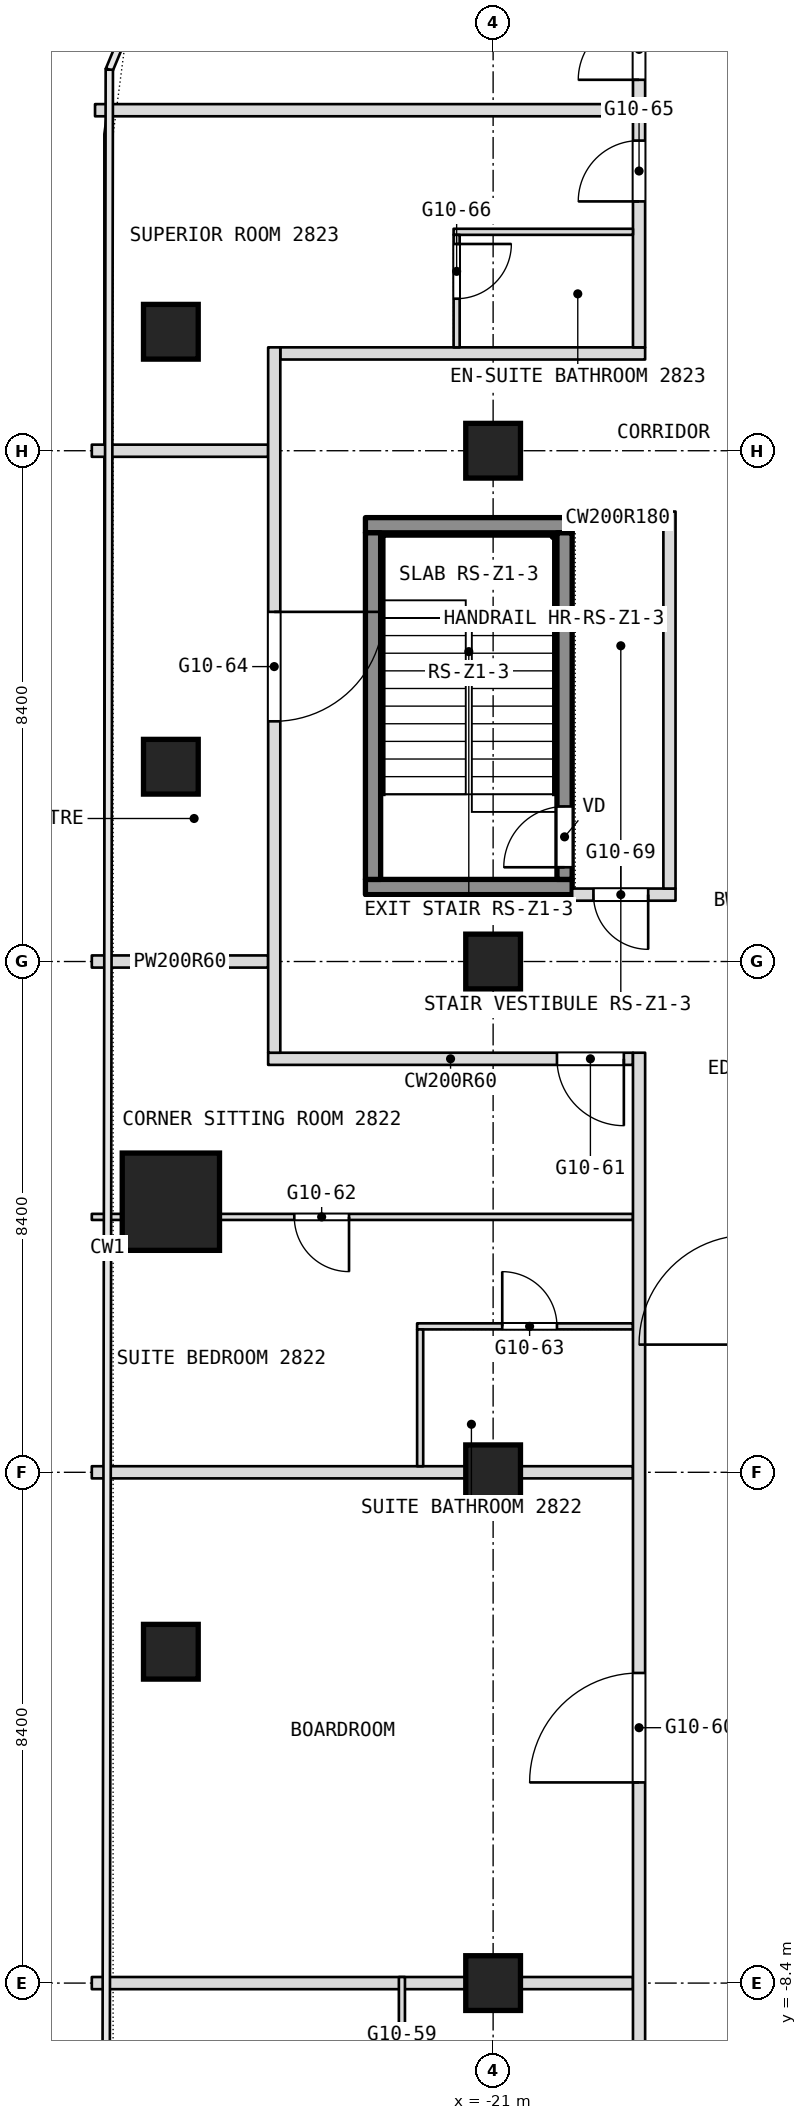
"""IFC4 building model, lengths in metres.
Left out: names, types, materials, properties, quantities, classifications, styles, units other than length and angle.
Written with IfcOpenShell. Run it as: python <this file> out.ifc"""

import sys

from ifc_helpers import new_model, si_unit, direction, frame, frame_2d, origin, origin_2d, place, context, subcontext, project, spatial, rectangle, extrude, element, fill, save


model = new_model("IFC4")
c1 = context("Model", 3, precision=1e-05, world=origin(), true_north=direction((0.0, 1.0)))
c2 = subcontext(c1, "Body", "Model", "MODEL_VIEW")
j1 = project(units=[si_unit("LENGTHUNIT", "METRE"), si_unit("PLANEANGLEUNIT", "RADIAN")], contexts=[c1])
p1 = place(None, origin())
s1 = spatial("IfcSite", under=j1, at=p1, CompositionType="ELEMENT")
p2 = place(p1, origin())
s2 = spatial("IfcBuilding", under=s1, at=p2, CompositionType="ELEMENT")
p3 = place(p2, frame((0.0, 0.0, 126.5)))
s3 = spatial("IfcBuildingStorey", under=s2, at=p3, CompositionType="ELEMENT", Elevation=126.5)
p4 = place(p3, frame((-26.3, 4.45, 0.0), z_axis=(0.0, 0.0, 1.0), x_axis=(1.0, 0.0, 0.0)))
e1 = element("IfcColumn", 1, at=p4, inside=s3, PredefinedType="COLUMN", context=c2, shape_type="SweptSolid", body=[
    extrude(rectangle(XDim=1.6, YDim=1.6, at=origin_2d()), origin(), (0.0, 0.0, 1.0), 3.6),
])
for number, where, z_axis, x_axis in (
    (2, (-21.0, -8.4, 0.0), (0.0, 0.0, 1.0), (1.0, 0.0, 0.0)),
    (3, (-21.0, 0.0, 0.0), (0.0, 0.0, 1.0), (1.0, 0.0, 0.0)),
    (4, (-21.0, 8.4, 0.0), (0.0, 0.0, 1.0), (1.0, 0.0, 0.0)),
    (5, (-21.0, 16.8, 0.0), (0.0, 0.0, 1.0), (1.0, 0.0, 0.0)),
    (6, (-26.3, -2.951, 0.0), (0.0, 0.0, 1.0), (1.0, 0.0, 0.0)),
    (7, (-26.3, 11.603, 0.0), (0.0, 0.0, 1.0), (1.0, 0.0, 0.0)),
    (8, (-26.3, 18.756, 0.0), (0.0, 0.0, 1.0), (1.0, 0.0, 0.0)),
):
    element("IfcColumn", number, at=place(p3, frame(where, z_axis=z_axis, x_axis=x_axis)), inside=s3, PredefinedType="COLUMN", context=c2, shape_type="SweptSolid", body=[
        extrude(rectangle(XDim=0.9, YDim=0.9, at=origin_2d()), origin(), (0.0, 0.0, 1.0), 3.6),
    ])
for number, where, z_axis, x_axis in (
    (9, (-27.6, -8.4, 0.0), (0.0, 0.0, 1.0), (1.0, 0.0, 0.0)),
    (10, (-27.6, 0.0, 0.0), (0.0, 0.0, 1.0), (1.0, 0.0, 0.0)),
):
    element("IfcWall", number, at=place(p3, frame(where, z_axis=z_axis, x_axis=x_axis)), inside=s3, PredefinedType="PARTITIONING", context=c2, shape_type="SweptSolid", body=[
        extrude(rectangle(XDim=8.9, YDim=0.2, at=frame_2d((4.45, 0.0))), origin(), (0.0, 0.0, 1.0), 2.89),
    ])
p5 = place(p3, frame((-22.25, 2.4, 0.0), z_axis=(0.0, 0.0, 1.0), x_axis=(1.0, 0.0, 0.0)))
e11 = element("IfcWall", 11, at=p5, inside=s3, PredefinedType="PARTITIONING", context=c2, shape_type="SweptSolid", body=[
    extrude(rectangle(XDim=3.55, YDim=0.1, at=frame_2d((1.775, 0.0))), origin(), (0.0, 0.0, 1.0), 3.34),
])
p6 = place(p5, frame((1.4, 0.0, 0.0)))
e12 = element("IfcOpeningElement", 12, at=p6, cuts=e11, PredefinedType="OPENING", context=c2, shape_type="SweptSolid", body=[
    extrude(rectangle(XDim=0.9, YDim=2.1, at=frame_2d((0.45, 1.05))), frame((0.0, 0.05, 0.0), z_axis=(0.0, -1.0, 0.0), x_axis=(1.0, 0.0, 0.0)), (0.0, 0.0, 1.0), 0.1),
])
p7 = place(p3, frame((-27.6, 4.2, 0.0), z_axis=(0.0, 0.0, 1.0), x_axis=(1.0, 0.0, 0.0)))
e13 = element("IfcWall", 13, at=p7, inside=s3, PredefinedType="PARTITIONING", context=c2, shape_type="SweptSolid", body=[
    extrude(rectangle(XDim=0.5, YDim=0.1, at=frame_2d((0.25, 0.0))), origin(), (0.0, 0.0, 1.0), 3.34),
])
p8 = place(p3, frame((-25.5, 4.2, 0.0), z_axis=(0.0, 0.0, 1.0), x_axis=(1.0, 0.0, 0.0)))
e14 = element("IfcWall", 14, at=p8, inside=s3, PredefinedType="PARTITIONING", context=c2, shape_type="SweptSolid", body=[
    extrude(rectangle(XDim=6.8, YDim=0.1, at=frame_2d((3.4, 0.0))), origin(), (0.0, 0.0, 1.0), 3.34),
])
p9 = place(p8, frame((1.23, 0.0, 0.0)))
e15 = element("IfcOpeningElement", 15, at=p9, cuts=e14, PredefinedType="OPENING", context=c2, shape_type="SweptSolid", body=[
    extrude(rectangle(XDim=0.9, YDim=2.1, at=frame_2d((0.45, 1.05))), frame((0.0, 0.05, 0.0), z_axis=(0.0, -1.0, 0.0), x_axis=(1.0, 0.0, 0.0)), (0.0, 0.0, 1.0), 0.1),
])
p10 = place(p3, frame((-24.7, 6.8, 0.0), z_axis=(0.0, 0.0, 1.0), x_axis=(1.0, 0.0, 0.0)))
e16 = element("IfcWall", 16, at=p10, inside=s3, PredefinedType="PARTITIONING", context=c2, shape_type="SweptSolid", body=[
    extrude(rectangle(XDim=6.0, YDim=0.2, at=frame_2d((3.0, 0.0))), origin(), (0.0, 0.0, 1.0), 3.34),
])
p11 = place(p10, frame((4.75, 0.0, 0.0)))
e17 = element("IfcOpeningElement", 17, at=p11, cuts=e16, PredefinedType="OPENING", context=c2, shape_type="SweptSolid", body=[
    extrude(rectangle(XDim=1.1, YDim=2.1, at=frame_2d((0.55, 1.05))), frame((0.0, 0.1, 0.0), z_axis=(0.0, -1.0, 0.0), x_axis=(1.0, 0.0, 0.0)), (0.0, 0.0, 1.0), 0.2),
])
p12 = place(p3, frame((-27.6, 8.4, 0.0), z_axis=(0.0, 0.0, 1.0), x_axis=(1.0, 0.0, 0.0)))
e18 = element("IfcWall", 18, at=p12, inside=s3, PredefinedType="PARTITIONING", context=c2, shape_type="SweptSolid", body=[
    extrude(rectangle(XDim=2.9, YDim=0.2, at=frame_2d((1.45, 0.0))), origin(), (0.0, 0.0, 1.0), 2.89),
])
p13 = place(p3, frame((-19.7, 9.5, 0.0), z_axis=(0.0, 0.0, 1.0), x_axis=(1.0, 0.0, 0.0)))
e19 = element("IfcWall", 19, at=p13, inside=s3, PredefinedType="PARTITIONING", context=c2, shape_type="SweptSolid", body=[
    extrude(rectangle(XDim=1.7, YDim=0.2, at=frame_2d((0.85, 0.0))), origin(), (0.0, 0.0, 1.0), 3.34),
])
p14 = place(p13, frame((0.35, 0.0, 0.0)))
e20 = element("IfcOpeningElement", 20, at=p14, cuts=e19, PredefinedType="OPENING", context=c2, shape_type="SweptSolid", body=[
    extrude(rectangle(XDim=0.9, YDim=2.1, at=frame_2d((0.45, 1.05))), frame((0.0, 0.1, 0.0), z_axis=(0.0, -1.0, 0.0), x_axis=(1.0, 0.0, 0.0)), (0.0, 0.0, 1.0), 0.2),
])
p15 = place(p3, frame((-19.7, 15.7, 0.0), z_axis=(0.0, 0.0, 1.0), x_axis=(1.0, 0.0, 0.0)))
e21 = element("IfcWall", 21, at=p15, inside=s3, PredefinedType="PARTITIONING", context=c2, shape_type="SweptSolid", body=[
    extrude(rectangle(XDim=1.5, YDim=0.2, at=frame_2d((0.75, 0.0))), origin(), (0.0, 0.0, 1.0), 3.34),
])
p16 = place(p3, frame((-27.6, 16.8, 0.0), z_axis=(0.0, 0.0, 1.0), x_axis=(1.0, 0.0, 0.0)))
e22 = element("IfcWall", 22, at=p16, inside=s3, PredefinedType="PARTITIONING", context=c2, shape_type="SweptSolid", body=[
    extrude(rectangle(XDim=2.9, YDim=0.2, at=frame_2d((1.45, 0.0))), origin(), (0.0, 0.0, 1.0), 2.89),
])
p17 = place(p3, frame((-18.1, 9.6, 0.0), z_axis=(0.0, 0.0, 1.0), x_axis=(0.0, 1.0, 0.0)))
e23 = element("IfcWall", 23, at=p17, inside=s3, PredefinedType="PARTITIONING", context=c2, shape_type="SweptSolid", body=[
    extrude(rectangle(XDim=6.2, YDim=0.2, at=frame_2d((3.1, 0.0))), origin(), (0.0, 0.0, 1.0), 3.34),
])
p18 = place(p3, frame((-24.5, 18.4, 0.0), z_axis=(0.0, 0.0, 1.0), x_axis=(1.0, 0.0, 0.0)))
e24 = element("IfcWall", 24, at=p18, inside=s3, PredefinedType="PARTITIONING", context=c2, shape_type="SweptSolid", body=[
    extrude(rectangle(XDim=6.0, YDim=0.2, at=frame_2d((3.0, 0.0))), origin(), (0.0, 0.0, 1.0), 3.34),
])
p19 = place(p3, frame((-18.6, -21.708, 0.0), z_axis=(0.0, 0.0, 1.0), x_axis=(0.0, 1.0, 0.0)))
e25 = element("IfcWall", 25, at=p19, inside=s3, PredefinedType="PARTITIONING", context=c2, shape_type="SweptSolid", body=[
    extrude(rectangle(XDim=28.608, YDim=0.2, at=frame_2d((14.304, 0.0))), origin(), (0.0, 0.0, 1.0), 3.34),
])
p20 = place(p19, frame((2.054, 0.0, 0.0)))
e26 = element("IfcOpeningElement", 26, at=p20, cuts=e25, PredefinedType="OPENING", context=c2, shape_type="SweptSolid", body=[
    extrude(rectangle(XDim=0.9, YDim=2.1, at=frame_2d((0.45, 1.05))), frame((0.0, 0.1, 0.0), z_axis=(0.0, -1.0, 0.0), x_axis=(1.0, 0.0, 0.0)), (0.0, 0.0, 1.0), 0.2),
])
p21 = place(p19, frame((7.708, 0.0, 0.0)))
e27 = element("IfcOpeningElement", 27, at=p21, cuts=e25, PredefinedType="OPENING", context=c2, shape_type="SweptSolid", body=[
    extrude(rectangle(XDim=1.0, YDim=2.1, at=frame_2d((0.5, 1.05))), frame((0.0, 0.1, 0.0), z_axis=(0.0, -1.0, 0.0), x_axis=(1.0, 0.0, 0.0)), (0.0, 0.0, 1.0), 0.2),
])
p22 = place(p19, frame((9.508, 0.0, 0.0)))
e28 = element("IfcOpeningElement", 28, at=p22, cuts=e25, PredefinedType="OPENING", context=c2, shape_type="SweptSolid", body=[
    extrude(rectangle(XDim=1.0, YDim=2.1, at=frame_2d((0.5, 1.05))), frame((0.0, 0.1, 0.0), z_axis=(0.0, -1.0, 0.0), x_axis=(1.0, 0.0, 0.0)), (0.0, 0.0, 1.0), 0.2),
])
p23 = place(p19, frame((16.608, 0.0, 0.0)))
e29 = element("IfcOpeningElement", 29, at=p23, cuts=e25, PredefinedType="OPENING", context=c2, shape_type="SweptSolid", body=[
    extrude(rectangle(XDim=1.8, YDim=2.1, at=frame_2d((0.9, 1.05))), frame((0.0, 0.1, 0.0), z_axis=(0.0, -1.0, 0.0), x_axis=(1.0, 0.0, 0.0)), (0.0, 0.0, 1.0), 0.2),
])
p24 = place(p3, frame((-18.6, 18.5, 0.0), z_axis=(0.0, 0.0, 1.0), x_axis=(0.0, 1.0, 0.0)))
e30 = element("IfcWall", 30, at=p24, inside=s3, PredefinedType="PARTITIONING", context=c2, shape_type="SweptSolid", body=[
    extrude(rectangle(XDim=9.44, YDim=0.2, at=frame_2d((4.72, 0.0))), origin(), (0.0, 0.0, 1.0), 3.34),
])
p25 = place(p24, frame((2.4, 0.0, 0.0)))
e31 = element("IfcOpeningElement", 31, at=p25, cuts=e30, PredefinedType="OPENING", context=c2, shape_type="SweptSolid", body=[
    extrude(rectangle(XDim=1.0, YDim=2.1, at=frame_2d((0.5, 1.05))), frame((0.0, 0.1, 0.0), z_axis=(0.0, -1.0, 0.0), x_axis=(1.0, 0.0, 0.0)), (0.0, 0.0, 1.0), 0.2),
])
p26 = place(p24, frame((4.4, 0.0, 0.0)))
e32 = element("IfcOpeningElement", 32, at=p26, cuts=e30, PredefinedType="OPENING", context=c2, shape_type="SweptSolid", body=[
    extrude(rectangle(XDim=1.0, YDim=2.1, at=frame_2d((0.5, 1.05))), frame((0.0, 0.1, 0.0), z_axis=(0.0, -1.0, 0.0), x_axis=(1.0, 0.0, 0.0)), (0.0, 0.0, 1.0), 0.2),
])
p27 = place(p3, frame((-21.65, 20.4, 0.0), z_axis=(0.0, 0.0, 1.0), x_axis=(1.0, 0.0, 0.0)))
e33 = element("IfcWall", 33, at=p27, inside=s3, PredefinedType="PARTITIONING", context=c2, shape_type="SweptSolid", body=[
    extrude(rectangle(XDim=2.95, YDim=0.1, at=frame_2d((1.475, 0.0))), origin(), (0.0, 0.0, 1.0), 3.34),
])
p28 = place(p3, frame((-21.6, 18.5, 0.0), z_axis=(0.0, 0.0, 1.0), x_axis=(0.0, 1.0, 0.0)))
e34 = element("IfcWall", 34, at=p28, inside=s3, PredefinedType="PARTITIONING", context=c2, shape_type="SweptSolid", body=[
    extrude(rectangle(XDim=1.85, YDim=0.1, at=frame_2d((0.925, 0.0))), origin(), (0.0, 0.0, 1.0), 3.34),
])
p29 = place(p28, frame((0.8, 0.0, 0.0)))
e35 = element("IfcOpeningElement", 35, at=p29, cuts=e34, PredefinedType="OPENING", context=c2, shape_type="SweptSolid", body=[
    extrude(rectangle(XDim=0.9, YDim=2.1, at=frame_2d((0.45, 1.05))), frame((0.0, 0.05, 0.0), z_axis=(0.0, -1.0, 0.0), x_axis=(1.0, 0.0, 0.0)), (0.0, 0.0, 1.0), 0.1),
])
p30 = place(p3, frame((-22.2, 0.1, 0.0), z_axis=(0.0, 0.0, 1.0), x_axis=(0.0, 1.0, 0.0)))
e36 = element("IfcWall", 36, at=p30, inside=s3, PredefinedType="PARTITIONING", context=c2, shape_type="SweptSolid", body=[
    extrude(rectangle(XDim=2.25, YDim=0.1, at=frame_2d((1.125, 0.0))), origin(), (0.0, 0.0, 1.0), 3.34),
])
p31 = place(p3, frame((-27.547, 22.4, 0.0), z_axis=(0.0, 0.0, 1.0), x_axis=(1.0, 0.0, 0.0)))
e37 = element("IfcWall", 37, at=p31, inside=s3, PredefinedType="PARTITIONING", context=c2, shape_type="SweptSolid", body=[
    extrude(rectangle(XDim=8.847, YDim=0.2, at=frame_2d((4.424, 0.0))), origin(), (0.0, 0.0, 1.0), 3.34),
])
p32 = place(p3, frame((-22.5, -10.85, 0.0), z_axis=(0.0, 0.0, 1.0), x_axis=(0.0, 1.0, 0.0)))
e38 = element("IfcWall", 38, at=p32, inside=s3, PredefinedType="PARTITIONING", context=c2, shape_type="SweptSolid", body=[
    extrude(rectangle(XDim=2.55, YDim=0.1, at=frame_2d((1.275, 0.0))), origin(), (0.0, 0.0, 1.0), 3.34),
])
p33 = place(p32, frame((0.15, 0.0, 0.0)))
e39 = element("IfcOpeningElement", 39, at=p33, cuts=e38, PredefinedType="OPENING", context=c2, shape_type="SweptSolid", body=[
    extrude(rectangle(XDim=0.9, YDim=2.1, at=frame_2d((0.45, 1.05))), frame((0.0, 0.05, 0.0), z_axis=(0.0, -1.0, 0.0), x_axis=(1.0, 0.0, 0.0)), (0.0, 0.0, 1.0), 0.1),
])
p34 = place(p3, frame((-24.6, 6.9, 0.0), z_axis=(0.0, 0.0, 1.0), x_axis=(0.0, 1.0, 0.0)))
e40 = element("IfcWall", 40, at=p34, inside=s3, PredefinedType="PARTITIONING", context=c2, shape_type="SweptSolid", body=[
    extrude(rectangle(XDim=11.6, YDim=0.2, at=frame_2d((5.8, 0.0))), origin(), (0.0, 0.0, 1.0), 3.34),
])
p35 = place(p34, frame((5.45, 0.0, 0.0)))
e41 = element("IfcOpeningElement", 41, at=p35, cuts=e40, PredefinedType="OPENING", context=c2, shape_type="SweptSolid", body=[
    extrude(rectangle(XDim=1.8, YDim=2.1, at=frame_2d((0.9, 1.05))), frame((0.0, 0.1, 0.0), z_axis=(0.0, -1.0, 0.0), x_axis=(1.0, 0.0, 0.0)), (0.0, 0.0, 1.0), 0.2),
])
for number, where, z_axis, x_axis in (
    (42, (-23.1, 9.625, 0.1), (0.0, 0.0, 1.0), (1.0, 0.0, 0.0)),
    (43, (-23.1, 15.575, 0.1), (0.0, 0.0, 1.0), (1.0, 0.0, 0.0)),
):
    element("IfcWall", number, at=place(p3, frame(where, z_axis=z_axis, x_axis=x_axis)), inside=s3, PredefinedType="SHEAR", context=c2, shape_type="SweptSolid", body=[
        extrude(rectangle(XDim=3.4, YDim=0.25, at=frame_2d((1.7, 0.0))), origin(), (0.0, 0.0, 1.0), 3.6),
    ])
p36 = place(p3, frame((-22.975, 9.75, 0.1), z_axis=(0.0, 0.0, 1.0), x_axis=(0.0, 1.0, 0.0)))
e44 = element("IfcWall", 44, at=p36, inside=s3, PredefinedType="SHEAR", context=c2, shape_type="SweptSolid", body=[
    extrude(rectangle(XDim=5.7, YDim=0.25, at=frame_2d((2.85, 0.0))), origin(), (0.0, 0.0, 1.0), 3.6),
])
p37 = place(p3, frame((-19.825, 9.75, 0.1), z_axis=(0.0, 0.0, 1.0), x_axis=(0.0, 1.0, 0.0)))
e45 = element("IfcWall", 45, at=p37, inside=s3, PredefinedType="SHEAR", context=c2, shape_type="SweptSolid", body=[
    extrude(rectangle(XDim=5.7, YDim=0.25, at=frame_2d((2.85, 0.0))), origin(), (0.0, 0.0, 1.0), 3.6),
])
p38 = place(p37, frame((0.2, 0.0, 0.0)))
e46 = element("IfcOpeningElement", 46, at=p38, cuts=e45, PredefinedType="OPENING", context=c2, shape_type="SweptSolid", body=[
    extrude(rectangle(XDim=1.0, YDim=2.1, at=frame_2d((0.5, 1.05))), frame((0.0, 0.125, 0.0), z_axis=(0.0, -1.0, 0.0), x_axis=(1.0, 0.0, 0.0)), (0.0, 0.0, 1.0), 0.25),
])
p39 = place(p6, origin())
e47 = element("IfcDoor", 47, at=p39, inside=s3, OperationType="SINGLE_SWING_LEFT", PredefinedType="DOOR", context=c2, shape_type="SweptSolid", body=[
    extrude(rectangle(XDim=0.9, YDim=2.1, at=frame_2d((0.45, 1.05))), frame((0.0, 0.025, 0.0), z_axis=(0.0, -1.0, 0.0), x_axis=(1.0, 0.0, 0.0)), (0.0, 0.0, 1.0), 0.05),
])
fill(e12, e47)
p40 = place(p9, origin())
e48 = element("IfcDoor", 48, at=p40, inside=s3, OperationType="SINGLE_SWING_RIGHT", PredefinedType="DOOR", context=c2, shape_type="SweptSolid", body=[
    extrude(rectangle(XDim=0.9, YDim=2.1, at=frame_2d((0.45, 1.05))), frame((0.0, 0.025, 0.0), z_axis=(0.0, -1.0, 0.0), x_axis=(1.0, 0.0, 0.0)), (0.0, 0.0, 1.0), 0.05),
])
fill(e15, e48)
p41 = place(p11, origin())
e49 = element("IfcDoor", 49, at=p41, inside=s3, OperationType="SINGLE_SWING_LEFT", PredefinedType="DOOR", context=c2, shape_type="SweptSolid", body=[
    extrude(rectangle(XDim=1.1, YDim=2.1, at=frame_2d((0.55, 1.05))), frame((0.0, 0.025, 0.0), z_axis=(0.0, -1.0, 0.0), x_axis=(1.0, 0.0, 0.0)), (0.0, 0.0, 1.0), 0.05),
])
fill(e17, e49)
p42 = place(p14, origin())
e50 = element("IfcDoor", 50, at=p42, inside=s3, OperationType="SINGLE_SWING_RIGHT", PredefinedType="DOOR", context=c2, shape_type="SweptSolid", body=[
    extrude(rectangle(XDim=0.9, YDim=2.1, at=frame_2d((0.45, 1.05))), frame((0.0, 0.025, 0.0), z_axis=(0.0, -1.0, 0.0), x_axis=(1.0, 0.0, 0.0)), (0.0, 0.0, 1.0), 0.05),
])
fill(e20, e50)
p43 = place(p23, origin())
e51 = element("IfcDoor", 51, at=p43, inside=s3, OperationType="DOUBLE_DOOR_SINGLE_SWING", PredefinedType="DOOR", context=c2, shape_type="SweptSolid", body=[
    extrude(rectangle(XDim=1.8, YDim=2.1, at=frame_2d((0.9, 1.05))), frame((0.0, 0.025, 0.0), z_axis=(0.0, -1.0, 0.0), x_axis=(1.0, 0.0, 0.0)), (0.0, 0.0, 1.0), 0.05),
])
fill(e29, e51)
p44 = place(p25, origin())
e52 = element("IfcDoor", 52, at=p44, inside=s3, OperationType="SINGLE_SWING_RIGHT", PredefinedType="DOOR", context=c2, shape_type="SweptSolid", body=[
    extrude(rectangle(XDim=1.0, YDim=2.1, at=frame_2d((0.5, 1.05))), frame((0.0, 0.025, 0.0), z_axis=(0.0, -1.0, 0.0), x_axis=(1.0, 0.0, 0.0)), (0.0, 0.0, 1.0), 0.05),
])
fill(e31, e52)
p45 = place(p26, origin())
e53 = element("IfcDoor", 53, at=p45, inside=s3, OperationType="SINGLE_SWING_RIGHT", PredefinedType="DOOR", context=c2, shape_type="SweptSolid", body=[
    extrude(rectangle(XDim=1.0, YDim=2.1, at=frame_2d((0.5, 1.05))), frame((0.0, 0.025, 0.0), z_axis=(0.0, -1.0, 0.0), x_axis=(1.0, 0.0, 0.0)), (0.0, 0.0, 1.0), 0.05),
])
fill(e32, e53)
p46 = place(p29, origin())
e54 = element("IfcDoor", 54, at=p46, inside=s3, OperationType="SINGLE_SWING_LEFT", PredefinedType="DOOR", context=c2, shape_type="SweptSolid", body=[
    extrude(rectangle(XDim=0.9, YDim=2.1, at=frame_2d((0.45, 1.05))), frame((0.0, 0.025, 0.0), z_axis=(0.0, -1.0, 0.0), x_axis=(1.0, 0.0, 0.0)), (0.0, 0.0, 1.0), 0.05),
])
fill(e35, e54)
p47 = place(p35, origin())
e55 = element("IfcDoor", 55, at=p47, inside=s3, OperationType="DOUBLE_DOOR_SINGLE_SWING", PredefinedType="DOOR", context=c2, shape_type="SweptSolid", body=[
    extrude(rectangle(XDim=1.8, YDim=2.1, at=frame_2d((0.9, 1.05))), frame((0.0, 0.025, 0.0), z_axis=(0.0, -1.0, 0.0), x_axis=(1.0, 0.0, 0.0)), (0.0, 0.0, 1.0), 0.05),
])
fill(e41, e55)
p48 = place(p38, origin())
e56 = element("IfcDoor", 56, at=p48, inside=s3, OperationType="SINGLE_SWING_LEFT", PredefinedType="DOOR", context=c2, shape_type="SweptSolid", body=[
    extrude(rectangle(XDim=1.0, YDim=2.1, at=frame_2d((0.5, 1.05))), frame((0.0, 0.025, 0.0), z_axis=(0.0, -1.0, 0.0), x_axis=(1.0, 0.0, 0.0)), (0.0, 0.0, 1.0), 0.05),
])
fill(e46, e56)
save(model, sys.argv[1])
